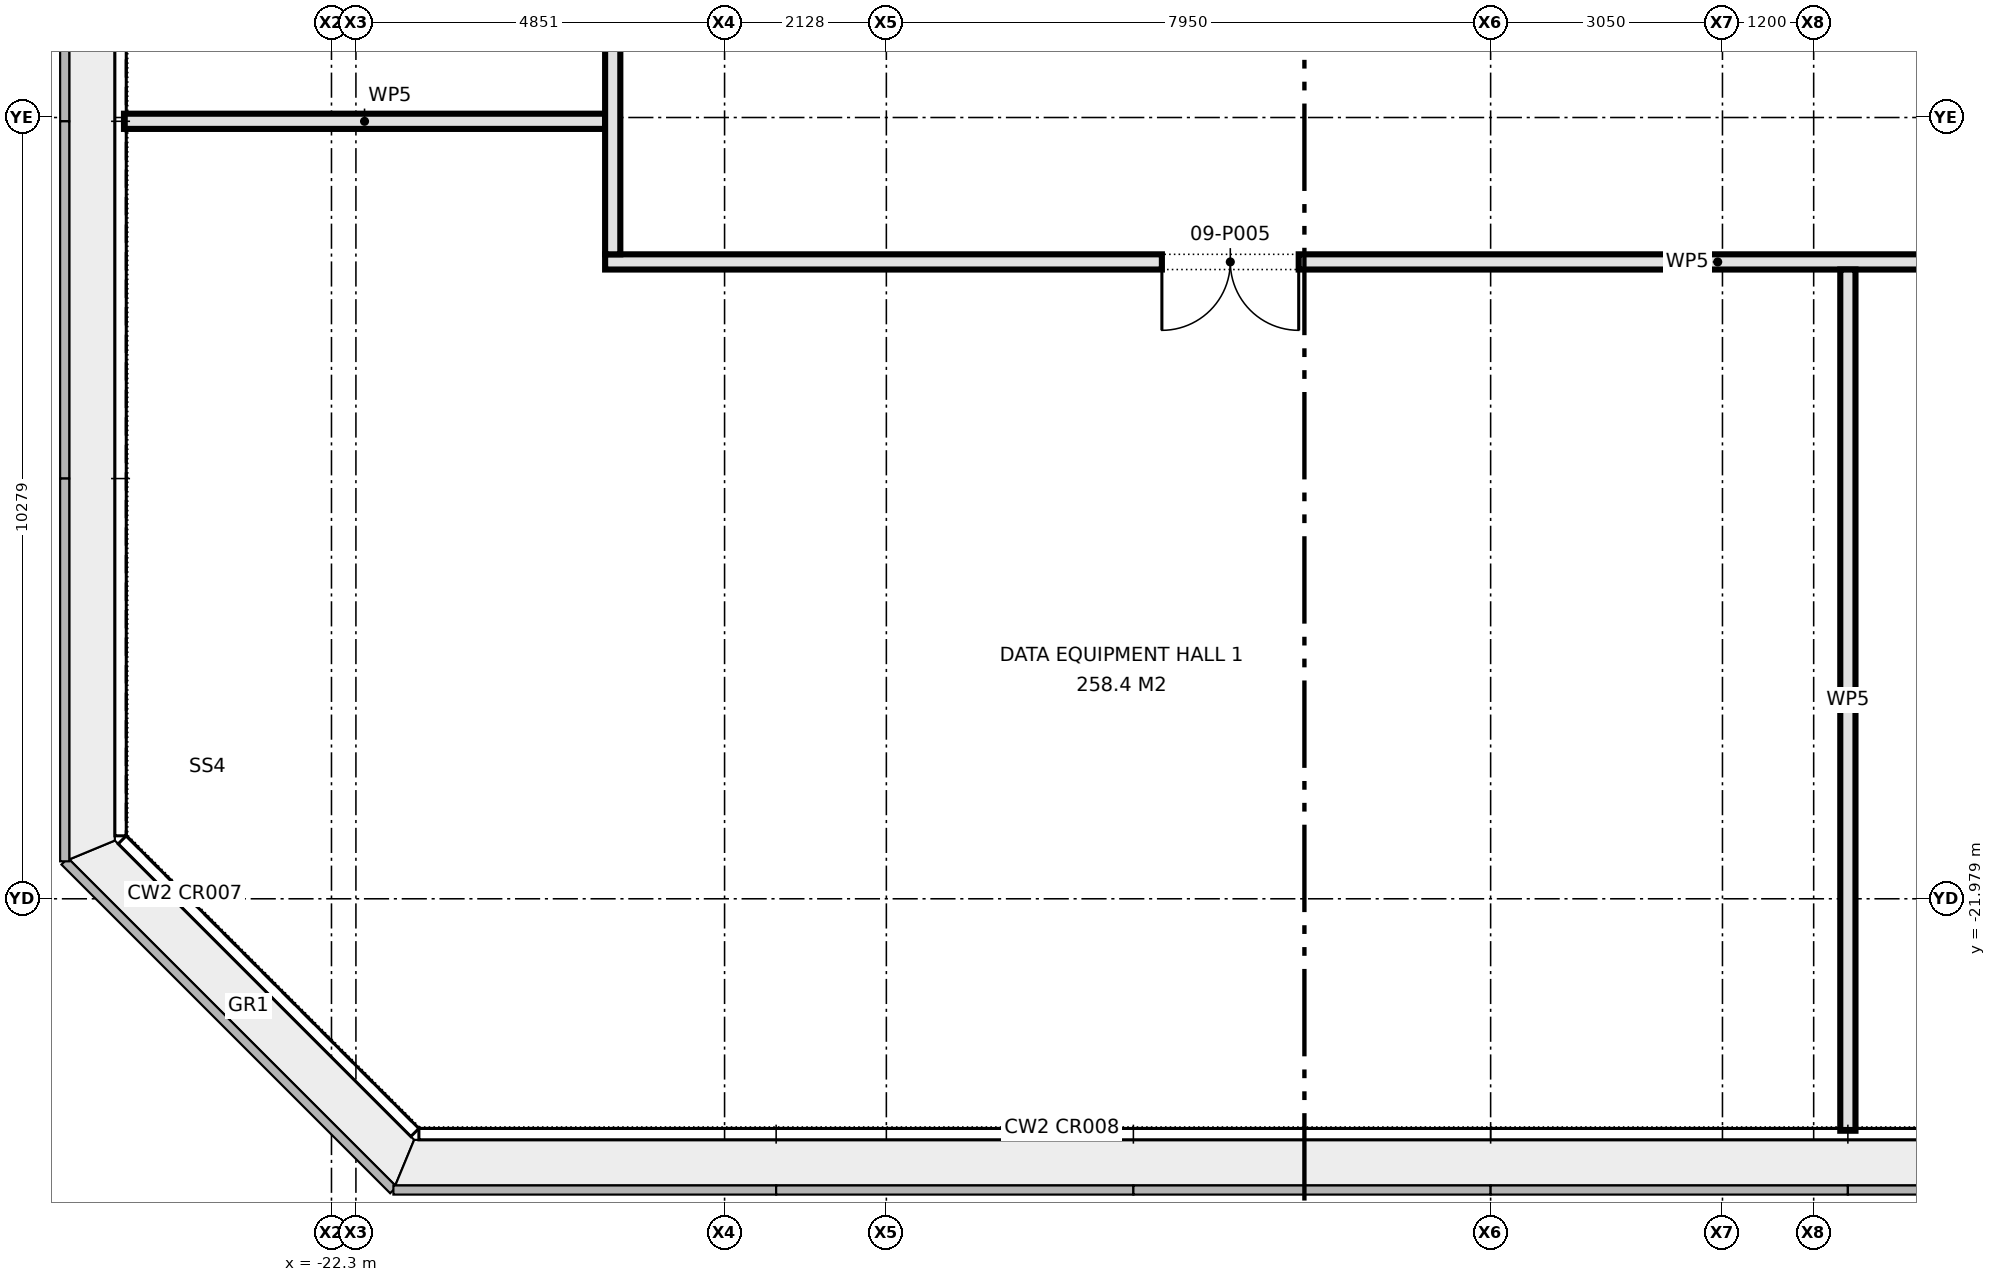
"""IFC4 building model, lengths in metres.
Left out: names, types, materials, properties, quantities, classifications, styles, units other than length and angle.
Written with IfcOpenShell. Run it as: python <this file> out.ifc"""

import sys

from ifc_helpers import new_model, si_unit, direction, frame, frame_2d, origin, place, context, subcontext, project, spatial, rectangle, extrude, element, fill, save


model = new_model("IFC4")
c1 = context("Model", 3, precision=1e-05, world=origin(), true_north=direction((0.0, 1.0)))
c2 = subcontext(c1, "Body", "Model", "MODEL_VIEW")
j1 = project(units=[si_unit("LENGTHUNIT", "METRE"), si_unit("PLANEANGLEUNIT", "RADIAN")], contexts=[c1])
p1 = place(None, origin())
s1 = spatial("IfcSite", under=j1, at=p1, CompositionType="ELEMENT")
p2 = place(p1, origin())
s2 = spatial("IfcBuilding", under=s1, at=p2, CompositionType="ELEMENT")
p3 = place(p2, frame((0.0, 0.0, 40.1)))
s3 = spatial("IfcBuildingStorey", under=s2, at=p3, CompositionType="ELEMENT", Elevation=40.1)
p4 = place(p3, frame((-18.7, -13.6, 0.0), z_axis=(0.0, 0.0, 1.0), x_axis=(1.0, 0.0, 0.0)))
e1 = element("IfcWall", 1, at=p4, inside=s3, PredefinedType="PARTITIONING", context=c2, shape_type="SweptSolid", body=[
    extrude(rectangle(XDim=37.4, YDim=0.2, at=frame_2d((18.7, 0.0))), origin(), (0.0, 0.0, 1.0), 4.575),
])
p5 = place(p4, frame((7.325, 0.0, 0.0)))
e2 = element("IfcOpeningElement", 2, at=p5, cuts=e1, PredefinedType="OPENING", context=c2, shape_type="SweptSolid", body=[
    extrude(rectangle(XDim=1.8, YDim=2.1, at=frame_2d((0.9, 1.05))), frame((0.0, 0.11, 0.0), z_axis=(0.0, -1.0, 0.0), x_axis=(1.0, 0.0, 0.0)), (0.0, 0.0, 1.0), 0.22),
])
p6 = place(p4, frame((20.15, 0.0, 0.0)))
e3 = element("IfcOpeningElement", 3, at=p6, cuts=e1, PredefinedType="OPENING", context=c2, shape_type="SweptSolid", body=[
    extrude(rectangle(XDim=1.8, YDim=2.1, at=frame_2d((0.9, 1.05))), frame((0.0, 0.11, 0.0), z_axis=(0.0, -1.0, 0.0), x_axis=(1.0, 0.0, 0.0)), (0.0, 0.0, 1.0), 0.22),
])
p7 = place(p4, frame((31.875, 0.0, 0.0)))
e4 = element("IfcOpeningElement", 4, at=p7, cuts=e1, PredefinedType="OPENING", context=c2, shape_type="SweptSolid", body=[
    extrude(rectangle(XDim=1.8, YDim=2.1, at=frame_2d((0.9, 1.05))), frame((0.0, 0.11, 0.0), z_axis=(0.0, -1.0, 0.0), x_axis=(1.0, 0.0, 0.0)), (0.0, 0.0, 1.0), 0.22),
])
p8 = place(p4, frame((26.4, 0.0, 0.0)))
e5 = element("IfcOpeningElement", 5, at=p8, cuts=e1, PredefinedType="OPENING", context=c2, shape_type="SweptSolid", body=[
    extrude(rectangle(XDim=1.2, YDim=2.1, at=frame_2d((0.6, 1.05))), frame((0.0, 0.11, 0.0), z_axis=(0.0, -1.0, 0.0), x_axis=(1.0, 0.0, 0.0)), (0.0, 0.0, 1.0), 0.22),
])
p9 = place(p3, frame((-25.03, -11.75, 0.0), z_axis=(0.0, 0.0, 1.0), x_axis=(1.0, 0.0, 0.0)))
e6 = element("IfcWall", 6, at=p9, inside=s3, PredefinedType="PARTITIONING", context=c2, shape_type="SweptSolid", body=[
    extrude(rectangle(XDim=6.33, YDim=0.2, at=frame_2d((3.165, 0.0))), origin(), (0.0, 0.0, 1.0), 4.575),
])
p10 = place(p3, frame((-2.35, -25.03, 0.0), z_axis=(0.0, 0.0, 1.0), x_axis=(0.0, 1.0, 0.0)))
e7 = element("IfcWall", 7, at=p10, inside=s3, PredefinedType="PARTITIONING", context=c2, shape_type="SweptSolid", body=[
    extrude(rectangle(XDim=11.33, YDim=0.2, at=frame_2d((5.665, 0.0))), origin(), (0.0, 0.0, 1.0), 4.575),
])
p11 = place(p3, frame((-18.6, -13.5, 0.0), z_axis=(0.0, 0.0, 1.0), x_axis=(0.0, 1.0, 0.0)))
e8 = element("IfcWall", 8, at=p11, inside=s3, PredefinedType="PARTITIONING", context=c2, shape_type="SweptSolid", body=[
    extrude(rectangle(XDim=27.0, YDim=0.2, at=frame_2d((13.5, 0.0))), origin(), (0.0, 0.0, 1.0), 4.575),
])
p12 = place(p11, frame((12.6, 0.0, 0.0)))
e9 = element("IfcOpeningElement", 9, at=p12, cuts=e8, PredefinedType="OPENING", context=c2, shape_type="SweptSolid", body=[
    extrude(rectangle(XDim=1.8, YDim=2.1, at=frame_2d((0.9, 1.05))), frame((0.0, 0.11, 0.0), z_axis=(0.0, -1.0, 0.0), x_axis=(1.0, 0.0, 0.0)), (0.0, 0.0, 1.0), 0.22),
])
p13 = place(p5, frame((1.8, 0.0, 0.0), z_axis=(0.0, 0.0, 1.0), x_axis=(-1.0, 0.0, 0.0)))
e10 = element("IfcDoor", 10, at=p13, inside=s3, OperationType="DOUBLE_DOOR_SINGLE_SWING", PredefinedType="DOOR", context=c2, shape_type="SweptSolid", body=[
    extrude(rectangle(XDim=1.8, YDim=2.1, at=frame_2d((0.9, 1.05))), frame((0.0, 0.025, 0.0), z_axis=(0.0, -1.0, 0.0), x_axis=(1.0, 0.0, 0.0)), (0.0, 0.0, 1.0), 0.05),
])
fill(e2, e10)
save(model, sys.argv[1])
